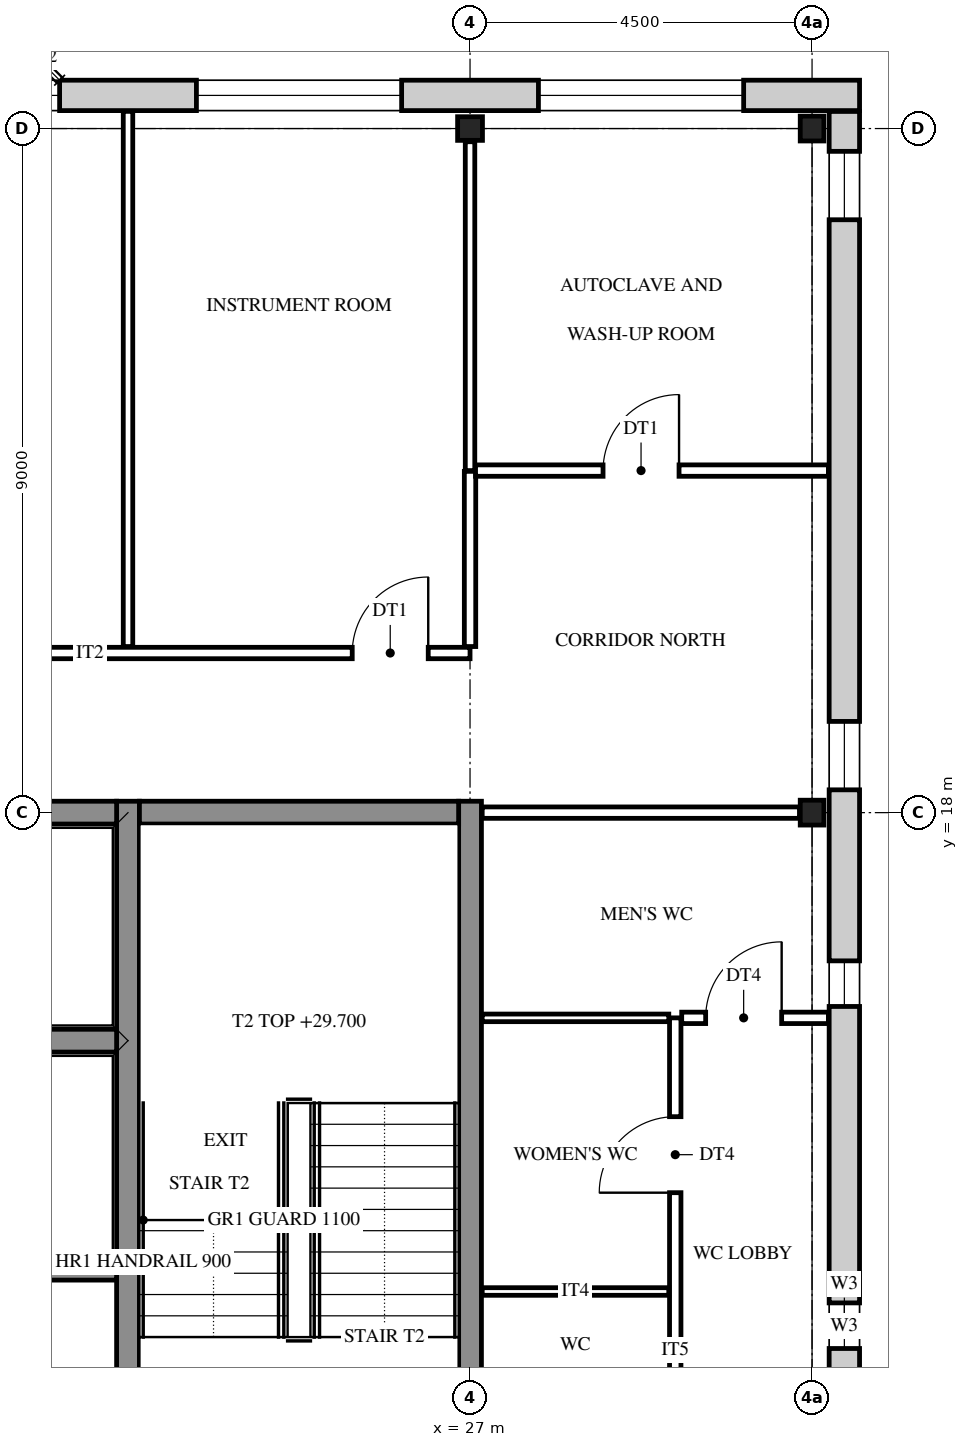
"""IFC4 building model, lengths in metres.
Left out: names, types, materials, properties, quantities, classifications, styles, units other than length and angle.
Written with IfcOpenShell. Run it as: python <this file> out.ifc"""

import sys

from ifc_helpers import new_model, si_unit, direction, frame, frame_2d, origin, origin_2d, place, context, subcontext, project, spatial, rectangle, i_section, extrude, element, fill, save


model = new_model("IFC4")
c1 = context("Model", 3, precision=1e-05, world=origin(), true_north=direction((0.0, 1.0)))
c2 = subcontext(c1, "Body", "Model", "MODEL_VIEW")
j1 = project(units=[si_unit("LENGTHUNIT", "METRE"), si_unit("PLANEANGLEUNIT", "RADIAN")], contexts=[c1])
p1 = place(None, origin())
s1 = spatial("IfcSite", under=j1, at=p1, CompositionType="ELEMENT")
p2 = place(p1, origin())
s2 = spatial("IfcBuilding", under=s1, at=p2, CompositionType="ELEMENT")
p3 = place(p2, frame((0.0, 0.0, 27.6)))
s3 = spatial("IfcBuildingStorey", under=s2, at=p3, CompositionType="ELEMENT", Elevation=27.6)
for number, where, z_axis, x_axis in (
    (1, (27.0, 27.0, 0.0), (0.0, 0.0, 1.0), (0.0, 1.0, 0.0)),
    (2, (31.5, 18.0, 0.0), (0.0, 0.0, 1.0), (1.0, 0.0, 0.0)),
    (3, (31.5, 27.0, 0.0), (0.0, 0.0, 1.0), (1.0, 0.0, 0.0)),
):
    element("IfcColumn", number, at=place(p3, frame(where, z_axis=z_axis, x_axis=x_axis)), inside=s3, PredefinedType="COLUMN", context=c2, shape_type="SweptSolid", body=[
        extrude(i_section(OverallWidth=0.311, OverallDepth=0.327, WebThickness=0.016, FlangeThickness=0.025, FilletRadius=0.017, at=origin_2d()), origin(), (0.0, 0.0, 1.0), 4.2),
    ])
for number, where, z_axis, x_axis in (
    (4, (22.5, 8.85, 0.0), (0.0, 0.0, 1.0), (0.0, 1.0, 0.0)),
    (5, (27.0, 8.85, 0.0), (0.0, 0.0, 1.0), (0.0, 1.0, 0.0)),
):
    element("IfcWall", number, at=place(p3, frame(where, z_axis=z_axis, x_axis=x_axis)), inside=s3, PredefinedType="SHEAR", context=c2, shape_type="SweptSolid", body=[
        extrude(rectangle(XDim=9.3, YDim=0.3, at=frame_2d((4.65, 0.0))), origin(), (0.0, 0.0, 1.0), 4.2),
    ])
for number, where, z_axis, x_axis in (
    (6, (19.65, 12.0, 0.0), (0.0, 0.0, 1.0), (1.0, 0.0, 0.0)),
    (7, (19.65, 15.0, 0.0), (0.0, 0.0, 1.0), (1.0, 0.0, 0.0)),
    (8, (19.65, 18.0, 0.0), (0.0, 0.0, 1.0), (1.0, 0.0, 0.0)),
):
    element("IfcWall", number, at=place(p3, frame(where, z_axis=z_axis, x_axis=x_axis)), inside=s3, PredefinedType="SHEAR", context=c2, shape_type="SweptSolid", body=[
        extrude(rectangle(XDim=2.7, YDim=0.3, at=frame_2d((1.35, 0.0))), origin(), (0.0, 0.0, 1.0), 4.2),
    ])
p4 = place(p3, frame((22.65, 18.0, 0.0), z_axis=(0.0, 0.0, 1.0), x_axis=(1.0, 0.0, 0.0)))
e9 = element("IfcWall", 9, at=p4, inside=s3, PredefinedType="SHEAR", context=c2, shape_type="SweptSolid", body=[
    extrude(rectangle(XDim=4.2, YDim=0.3, at=frame_2d((2.1, 0.0))), origin(), (0.0, 0.0, 1.0), 4.2),
])
p5 = place(p3, frame((-0.625, 27.436, 0.0), z_axis=(0.0, 0.0, 1.0), x_axis=(1.0, 0.0, 0.0)))
e10 = element("IfcWall", 10, at=p5, inside=s3, PredefinedType="STANDARD", context=c2, shape_type="SweptSolid", body=[
    extrude(rectangle(XDim=32.75, YDim=0.4, at=frame_2d((16.375, 0.0))), origin(), (0.0, 0.0, 1.0), 4.2),
])
p6 = place(p5, frame((1.525, 0.0, 0.9)))
e11 = element("IfcOpeningElement", 11, at=p6, cuts=e10, PredefinedType="OPENING", context=c2, shape_type="SweptSolid", body=[
    extrude(rectangle(XDim=2.7, YDim=2.5, at=frame_2d((1.35, 1.25))), frame((0.0, 0.21, 0.0), z_axis=(0.0, -1.0, 0.0), x_axis=(1.0, 0.0, 0.0)), (0.0, 0.0, 1.0), 0.42),
])
p7 = place(p5, frame((6.025, 0.0, 0.9)))
e12 = element("IfcOpeningElement", 12, at=p7, cuts=e10, PredefinedType="OPENING", context=c2, shape_type="SweptSolid", body=[
    extrude(rectangle(XDim=2.7, YDim=2.5, at=frame_2d((1.35, 1.25))), frame((0.0, 0.21, 0.0), z_axis=(0.0, -1.0, 0.0), x_axis=(1.0, 0.0, 0.0)), (0.0, 0.0, 1.0), 0.42),
])
p8 = place(p5, frame((10.525, 0.0, 0.9)))
e13 = element("IfcOpeningElement", 13, at=p8, cuts=e10, PredefinedType="OPENING", context=c2, shape_type="SweptSolid", body=[
    extrude(rectangle(XDim=2.7, YDim=2.5, at=frame_2d((1.35, 1.25))), frame((0.0, 0.21, 0.0), z_axis=(0.0, -1.0, 0.0), x_axis=(1.0, 0.0, 0.0)), (0.0, 0.0, 1.0), 0.42),
])
p9 = place(p5, frame((15.025, 0.0, 0.9)))
e14 = element("IfcOpeningElement", 14, at=p9, cuts=e10, PredefinedType="OPENING", context=c2, shape_type="SweptSolid", body=[
    extrude(rectangle(XDim=2.7, YDim=2.5, at=frame_2d((1.35, 1.25))), frame((0.0, 0.21, 0.0), z_axis=(0.0, -1.0, 0.0), x_axis=(1.0, 0.0, 0.0)), (0.0, 0.0, 1.0), 0.42),
])
p10 = place(p5, frame((19.525, 0.0, 0.9)))
e15 = element("IfcOpeningElement", 15, at=p10, cuts=e10, PredefinedType="OPENING", context=c2, shape_type="SweptSolid", body=[
    extrude(rectangle(XDim=2.7, YDim=2.5, at=frame_2d((1.35, 1.25))), frame((0.0, 0.21, 0.0), z_axis=(0.0, -1.0, 0.0), x_axis=(1.0, 0.0, 0.0)), (0.0, 0.0, 1.0), 0.42),
])
p11 = place(p5, frame((24.025, 0.0, 0.9)))
e16 = element("IfcOpeningElement", 16, at=p11, cuts=e10, PredefinedType="OPENING", context=c2, shape_type="SweptSolid", body=[
    extrude(rectangle(XDim=2.7, YDim=2.5, at=frame_2d((1.35, 1.25))), frame((0.0, 0.21, 0.0), z_axis=(0.0, -1.0, 0.0), x_axis=(1.0, 0.0, 0.0)), (0.0, 0.0, 1.0), 0.42),
])
p12 = place(p5, frame((28.525, 0.0, 0.9)))
e17 = element("IfcOpeningElement", 17, at=p12, cuts=e10, PredefinedType="OPENING", context=c2, shape_type="SweptSolid", body=[
    extrude(rectangle(XDim=2.7, YDim=2.5, at=frame_2d((1.35, 1.25))), frame((0.0, 0.21, 0.0), z_axis=(0.0, -1.0, 0.0), x_axis=(1.0, 0.0, 0.0)), (0.0, 0.0, 1.0), 0.42),
])
p13 = place(p3, frame((31.925, 27.225, 0.0), z_axis=(0.0, 0.0, 1.0), x_axis=(0.0, -1.0, 0.0)))
e18 = element("IfcWall", 18, at=p13, inside=s3, PredefinedType="STANDARD", context=c2, shape_type="SweptSolid", body=[
    extrude(rectangle(XDim=27.45, YDim=0.4, at=frame_2d((13.725, 0.0))), origin(), (0.0, 0.0, 1.0), 4.2),
])
p14 = place(p13, frame((26.025, 0.0, 0.9)))
e19 = element("IfcOpeningElement", 19, at=p14, cuts=e18, PredefinedType="OPENING", context=c2, shape_type="SweptSolid", body=[
    extrude(rectangle(XDim=0.9, YDim=2.0, at=frame_2d((0.45, 1.0))), frame((0.0, 0.21, 0.0), z_axis=(0.0, -1.0, 0.0), x_axis=(1.0, 0.0, 0.0)), (0.0, 0.0, 1.0), 0.42),
])
p15 = place(p13, frame((18.525, 0.0, 0.9)))
e20 = element("IfcOpeningElement", 20, at=p15, cuts=e18, PredefinedType="OPENING", context=c2, shape_type="SweptSolid", body=[
    extrude(rectangle(XDim=0.9, YDim=2.0, at=frame_2d((0.45, 1.0))), frame((0.0, 0.21, 0.0), z_axis=(0.0, -1.0, 0.0), x_axis=(1.0, 0.0, 0.0)), (0.0, 0.0, 1.0), 0.42),
])
p16 = place(p13, frame((15.675, 0.0, 1.6)))
e21 = element("IfcOpeningElement", 21, at=p16, cuts=e18, PredefinedType="OPENING", context=c2, shape_type="SweptSolid", body=[
    extrude(rectangle(XDim=0.6, YDim=0.9, at=frame_2d((0.3, 0.45))), frame((0.0, 0.21, 0.0), z_axis=(0.0, -1.0, 0.0), x_axis=(1.0, 0.0, 0.0)), (0.0, 0.0, 1.0), 0.42),
])
p17 = place(p13, frame((11.175, 0.0, 1.6)))
e22 = element("IfcOpeningElement", 22, at=p17, cuts=e18, PredefinedType="OPENING", context=c2, shape_type="SweptSolid", body=[
    extrude(rectangle(XDim=0.6, YDim=0.9, at=frame_2d((0.3, 0.45))), frame((0.0, 0.21, 0.0), z_axis=(0.0, -1.0, 0.0), x_axis=(1.0, 0.0, 0.0)), (0.0, 0.0, 1.0), 0.42),
])
p18 = place(p13, frame((8.025, 0.0, 0.9)))
e23 = element("IfcOpeningElement", 23, at=p18, cuts=e18, PredefinedType="OPENING", context=c2, shape_type="SweptSolid", body=[
    extrude(rectangle(XDim=0.9, YDim=2.0, at=frame_2d((0.45, 1.0))), frame((0.0, 0.21, 0.0), z_axis=(0.0, -1.0, 0.0), x_axis=(1.0, 0.0, 0.0)), (0.0, 0.0, 1.0), 0.42),
])
p19 = place(p13, frame((0.525, 0.0, 0.9)))
e24 = element("IfcOpeningElement", 24, at=p19, cuts=e18, PredefinedType="OPENING", context=c2, shape_type="SweptSolid", body=[
    extrude(rectangle(XDim=0.9, YDim=2.0, at=frame_2d((0.45, 1.0))), frame((0.0, 0.21, 0.0), z_axis=(0.0, -1.0, 0.0), x_axis=(1.0, 0.0, 0.0)), (0.0, 0.0, 1.0), 0.42),
])
p20 = place(p3, frame((22.5, 20.185, 0.0), z_axis=(0.0, 0.0, 1.0), x_axis=(0.0, 1.0, 0.0)))
e25 = element("IfcWall", 25, at=p20, inside=s3, PredefinedType="PARTITIONING", context=c2, shape_type="SweptSolid", body=[
    extrude(rectangle(XDim=7.041, YDim=0.125, at=frame_2d((3.521, 0.0))), origin(), (0.0, 0.0, 1.0), 3.537),
])
p21 = place(p3, frame((27.0, 20.185, 0.0), z_axis=(0.0, 0.0, 1.0), x_axis=(0.0, 1.0, 0.0)))
e26 = element("IfcWall", 26, at=p21, inside=s3, PredefinedType="PARTITIONING", context=c2, shape_type="SweptSolid", body=[
    extrude(rectangle(XDim=2.305, YDim=0.15, at=frame_2d((1.152, 0.0))), origin(), (0.0, 0.0, 1.0), 3.537),
])
p22 = place(p3, frame((27.0, 22.5, 0.0), z_axis=(0.0, 0.0, 1.0), x_axis=(0.0, 1.0, 0.0)))
e27 = element("IfcWall", 27, at=p22, inside=s3, PredefinedType="PARTITIONING", context=c2, shape_type="SweptSolid", body=[
    extrude(rectangle(XDim=4.326, YDim=0.125, at=frame_2d((2.163, 0.0))), origin(), (0.0, 0.0, 1.0), 3.537),
])
p23 = place(p3, frame((29.7, 9.0, 0.0), z_axis=(0.0, 0.0, 1.0), x_axis=(0.0, 1.0, 0.0)))
e28 = element("IfcWall", 28, at=p23, inside=s3, PredefinedType="PARTITIONING", context=c2, shape_type="SweptSolid", body=[
    extrude(rectangle(XDim=6.3, YDim=0.15, at=frame_2d((3.15, 0.0))), origin(), (0.0, 0.0, 1.0), 3.537),
])
p24 = place(p23, frame((4.0, 0.0, 0.0)))
e29 = element("IfcOpeningElement", 29, at=p24, cuts=e28, PredefinedType="OPENING", context=c2, shape_type="SweptSolid", body=[
    extrude(rectangle(XDim=1.0, YDim=2.1, at=frame_2d((0.5, 1.05))), frame((0.0, 0.085, 0.0), z_axis=(0.0, -1.0, 0.0), x_axis=(1.0, 0.0, 0.0)), (0.0, 0.0, 1.0), 0.17),
])
for number, where, z_axis, x_axis in (
    (30, (27.16, 11.7, 0.0), (0.0, 0.0, 1.0), (1.0, 0.0, 0.0)),
    (31, (27.16, 15.3, 0.0), (0.0, 0.0, 1.0), (1.0, 0.0, 0.0)),
):
    element("IfcWall", number, at=place(p3, frame(where, z_axis=z_axis, x_axis=x_axis)), inside=s3, PredefinedType="PARTITIONING", context=c2, shape_type="SweptSolid", body=[
        extrude(rectangle(XDim=2.455, YDim=0.1, at=frame_2d((1.228, 0.0))), origin(), (0.0, 0.0, 1.0), 3.537),
    ])
p25 = place(p3, frame((29.785, 15.3, 0.0), z_axis=(0.0, 0.0, 1.0), x_axis=(1.0, 0.0, 0.0)))
e32 = element("IfcWall", 32, at=p25, inside=s3, PredefinedType="PARTITIONING", context=c2, shape_type="SweptSolid", body=[
    extrude(rectangle(XDim=1.93, YDim=0.15, at=frame_2d((0.965, 0.0))), origin(), (0.0, 0.0, 1.0), 3.537),
])
p26 = place(p25, frame((0.315, 0.0, 0.0)))
e33 = element("IfcOpeningElement", 33, at=p26, cuts=e32, PredefinedType="OPENING", context=c2, shape_type="SweptSolid", body=[
    extrude(rectangle(XDim=1.0, YDim=2.1, at=frame_2d((0.5, 1.05))), frame((0.0, 0.085, 0.0), z_axis=(0.0, -1.0, 0.0), x_axis=(1.0, 0.0, 0.0)), (0.0, 0.0, 1.0), 0.17),
])
p27 = place(p3, frame((27.16, 18.0, 0.0), z_axis=(0.0, 0.0, 1.0), x_axis=(1.0, 0.0, 0.0)))
e34 = element("IfcWall", 34, at=p27, inside=s3, PredefinedType="PARTITIONING", context=c2, shape_type="SweptSolid", body=[
    extrude(rectangle(XDim=4.175, YDim=0.15, at=frame_2d((2.087, 0.0))), origin(), (0.0, 0.0, 1.0), 3.537),
])
p28 = place(p3, frame((6.9, 20.1, 0.0), z_axis=(0.0, 0.0, 1.0), x_axis=(1.0, 0.0, 0.0)))
e35 = element("IfcWall", 35, at=p28, inside=s3, PredefinedType="PARTITIONING", context=c2, shape_type="SweptSolid", body=[
    extrude(rectangle(XDim=20.1, YDim=0.15, at=frame_2d((10.05, 0.0))), origin(), (0.0, 0.0, 1.0), 3.537),
])
p29 = place(p28, frame((2.75, 0.0, 0.0)))
e36 = element("IfcOpeningElement", 36, at=p29, cuts=e35, PredefinedType="OPENING", context=c2, shape_type="SweptSolid", body=[
    extrude(rectangle(XDim=1.1, YDim=2.1, at=frame_2d((0.55, 1.05))), frame((0.0, 0.085, 0.0), z_axis=(0.0, -1.0, 0.0), x_axis=(1.0, 0.0, 0.0)), (0.0, 0.0, 1.0), 0.17),
])
p30 = place(p28, frame((10.55, 0.0, 0.0)))
e37 = element("IfcOpeningElement", 37, at=p30, cuts=e35, PredefinedType="OPENING", context=c2, shape_type="SweptSolid", body=[
    extrude(rectangle(XDim=1.1, YDim=2.1, at=frame_2d((0.55, 1.05))), frame((0.0, 0.085, 0.0), z_axis=(0.0, -1.0, 0.0), x_axis=(1.0, 0.0, 0.0)), (0.0, 0.0, 1.0), 0.17),
])
p31 = place(p28, frame((18.55, 0.0, 0.0)))
e38 = element("IfcOpeningElement", 38, at=p31, cuts=e35, PredefinedType="OPENING", context=c2, shape_type="SweptSolid", body=[
    extrude(rectangle(XDim=1.0, YDim=2.1, at=frame_2d((0.5, 1.05))), frame((0.0, 0.085, 0.0), z_axis=(0.0, -1.0, 0.0), x_axis=(1.0, 0.0, 0.0)), (0.0, 0.0, 1.0), 0.17),
])
p32 = place(p3, frame((27.073, 22.5, 0.0), z_axis=(0.0, 0.0, 1.0), x_axis=(1.0, 0.0, 0.0)))
e39 = element("IfcWall", 39, at=p32, inside=s3, PredefinedType="PARTITIONING", context=c2, shape_type="SweptSolid", body=[
    extrude(rectangle(XDim=4.643, YDim=0.15, at=frame_2d((2.321, 0.0))), origin(), (0.0, 0.0, 1.0), 3.537),
])
p33 = place(p32, frame((1.677, 0.0, 0.0)))
e40 = element("IfcOpeningElement", 40, at=p33, cuts=e39, PredefinedType="OPENING", context=c2, shape_type="SweptSolid", body=[
    extrude(rectangle(XDim=1.0, YDim=2.1, at=frame_2d((0.5, 1.05))), frame((0.0, 0.085, 0.0), z_axis=(0.0, -1.0, 0.0), x_axis=(1.0, 0.0, 0.0)), (0.0, 0.0, 1.0), 0.17),
])
p34 = place(p10, origin())
e41 = element("IfcWindow", 41, at=p34, inside=s3, PartitioningType="SINGLE_PANEL", PredefinedType="WINDOW", context=c2, shape_type="SweptSolid", body=[
    extrude(rectangle(XDim=2.7, YDim=2.5, at=frame_2d((1.35, 1.25))), frame((0.0, 0.03, 0.0), z_axis=(0.0, -1.0, 0.0), x_axis=(1.0, 0.0, 0.0)), (0.0, 0.0, 1.0), 0.06),
])
fill(e15, e41)
p35 = place(p11, origin())
e42 = element("IfcWindow", 42, at=p35, inside=s3, PartitioningType="SINGLE_PANEL", PredefinedType="WINDOW", context=c2, shape_type="SweptSolid", body=[
    extrude(rectangle(XDim=2.7, YDim=2.5, at=frame_2d((1.35, 1.25))), frame((0.0, 0.03, 0.0), z_axis=(0.0, -1.0, 0.0), x_axis=(1.0, 0.0, 0.0)), (0.0, 0.0, 1.0), 0.06),
])
fill(e16, e42)
p36 = place(p12, origin())
e43 = element("IfcWindow", 43, at=p36, inside=s3, PartitioningType="SINGLE_PANEL", PredefinedType="WINDOW", context=c2, shape_type="SweptSolid", body=[
    extrude(rectangle(XDim=2.7, YDim=2.5, at=frame_2d((1.35, 1.25))), frame((0.0, 0.03, 0.0), z_axis=(0.0, -1.0, 0.0), x_axis=(1.0, 0.0, 0.0)), (0.0, 0.0, 1.0), 0.06),
])
fill(e17, e43)
p37 = place(p16, origin())
e44 = element("IfcWindow", 44, at=p37, inside=s3, PartitioningType="SINGLE_PANEL", PredefinedType="WINDOW", context=c2, shape_type="SweptSolid", body=[
    extrude(rectangle(XDim=0.6, YDim=0.9, at=frame_2d((0.3, 0.45))), frame((0.0, 0.03, 0.0), z_axis=(0.0, -1.0, 0.0), x_axis=(1.0, 0.0, 0.0)), (0.0, 0.0, 1.0), 0.06),
])
fill(e21, e44)
p38 = place(p17, origin())
e45 = element("IfcWindow", 45, at=p38, inside=s3, PartitioningType="SINGLE_PANEL", PredefinedType="WINDOW", context=c2, shape_type="SweptSolid", body=[
    extrude(rectangle(XDim=0.6, YDim=0.9, at=frame_2d((0.3, 0.45))), frame((0.0, 0.03, 0.0), z_axis=(0.0, -1.0, 0.0), x_axis=(1.0, 0.0, 0.0)), (0.0, 0.0, 1.0), 0.06),
])
fill(e22, e45)
p39 = place(p18, origin())
e46 = element("IfcWindow", 46, at=p39, inside=s3, PartitioningType="SINGLE_PANEL", PredefinedType="WINDOW", context=c2, shape_type="SweptSolid", body=[
    extrude(rectangle(XDim=0.9, YDim=2.0, at=frame_2d((0.45, 1.0))), frame((0.0, 0.03, 0.0), z_axis=(0.0, -1.0, 0.0), x_axis=(1.0, 0.0, 0.0)), (0.0, 0.0, 1.0), 0.06),
])
fill(e23, e46)
p40 = place(p19, origin())
e47 = element("IfcWindow", 47, at=p40, inside=s3, PartitioningType="SINGLE_PANEL", PredefinedType="WINDOW", context=c2, shape_type="SweptSolid", body=[
    extrude(rectangle(XDim=0.9, YDim=2.0, at=frame_2d((0.45, 1.0))), frame((0.0, 0.03, 0.0), z_axis=(0.0, -1.0, 0.0), x_axis=(1.0, 0.0, 0.0)), (0.0, 0.0, 1.0), 0.06),
])
fill(e24, e47)
p41 = place(p24, origin())
e48 = element("IfcDoor", 48, at=p41, inside=s3, OperationType="SINGLE_SWING_LEFT", PredefinedType="DOOR", context=c2, shape_type="SweptSolid", body=[
    extrude(rectangle(XDim=1.0, YDim=2.1, at=frame_2d((0.5, 1.05))), frame((0.0, 0.025, 0.0), z_axis=(0.0, -1.0, 0.0), x_axis=(1.0, 0.0, 0.0)), (0.0, 0.0, 1.0), 0.05),
])
fill(e29, e48)
p42 = place(p26, origin())
e49 = element("IfcDoor", 49, at=p42, inside=s3, OperationType="SINGLE_SWING_RIGHT", PredefinedType="DOOR", context=c2, shape_type="SweptSolid", body=[
    extrude(rectangle(XDim=1.0, YDim=2.1, at=frame_2d((0.5, 1.05))), frame((0.0, 0.025, 0.0), z_axis=(0.0, -1.0, 0.0), x_axis=(1.0, 0.0, 0.0)), (0.0, 0.0, 1.0), 0.05),
])
fill(e33, e49)
p43 = place(p31, origin())
e50 = element("IfcDoor", 50, at=p43, inside=s3, OperationType="SINGLE_SWING_RIGHT", PredefinedType="DOOR", context=c2, shape_type="SweptSolid", body=[
    extrude(rectangle(XDim=1.0, YDim=2.1, at=frame_2d((0.5, 1.05))), frame((0.0, 0.025, 0.0), z_axis=(0.0, -1.0, 0.0), x_axis=(1.0, 0.0, 0.0)), (0.0, 0.0, 1.0), 0.05),
])
fill(e38, e50)
p44 = place(p33, origin())
e51 = element("IfcDoor", 51, at=p44, inside=s3, OperationType="SINGLE_SWING_RIGHT", PredefinedType="DOOR", context=c2, shape_type="SweptSolid", body=[
    extrude(rectangle(XDim=1.0, YDim=2.1, at=frame_2d((0.5, 1.05))), frame((0.0, 0.025, 0.0), z_axis=(0.0, -1.0, 0.0), x_axis=(1.0, 0.0, 0.0)), (0.0, 0.0, 1.0), 0.05),
])
fill(e40, e51)
save(model, sys.argv[1])
